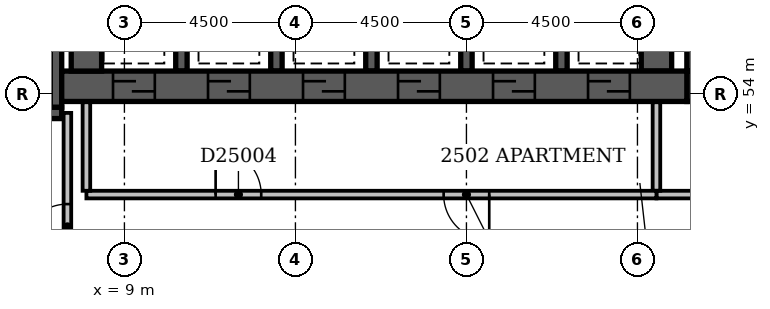
"""IFC4 building model, lengths in metres.
Left out: names, types, materials, properties, quantities, classifications, styles, units other than length and angle.
Written with IfcOpenShell. Run it as: python <this file> out.ifc"""

import sys

from ifc_helpers import new_model, si_unit, direction, frame, frame_2d, origin, place, context, subcontext, project, spatial, rectangle, extrude, element, fill, save


model = new_model("IFC4")
c1 = context("Model", 3, precision=1e-05, world=origin(), true_north=direction((0.0, 1.0)))
c2 = subcontext(c1, "Body", "Model", "MODEL_VIEW")
j1 = project(units=[si_unit("LENGTHUNIT", "METRE"), si_unit("PLANEANGLEUNIT", "RADIAN")], contexts=[c1])
p1 = place(None, origin())
s1 = spatial("IfcSite", under=j1, at=p1, CompositionType="ELEMENT")
p2 = place(p1, origin())
s2 = spatial("IfcBuilding", under=s1, at=p2, CompositionType="ELEMENT")
p3 = place(p2, frame((0.0, 0.0, 101.0)))
s3 = spatial("IfcBuildingStorey", under=s2, at=p3, CompositionType="ELEMENT", Elevation=101.0)
p4 = place(p3, frame((0.35, 53.5, -0.3), z_axis=(0.0, 0.0, 1.0), x_axis=(1.0, 0.0, 0.0)))
e1 = element("IfcWall", 1, at=p4, inside=s3, PredefinedType="SHEAR", context=c2, shape_type="SweptSolid", body=[
    extrude(rectangle(XDim=7.0, YDim=0.3, at=frame_2d((3.5, 0.0))), origin(), (0.0, 0.0, 1.0), 3.6),
])
p5 = place(p4, frame((5.58, 0.0, 0.3)))
e2 = element("IfcOpeningElement", 2, at=p5, cuts=e1, PredefinedType="OPENING", context=c2, shape_type="SweptSolid", body=[
    extrude(rectangle(XDim=1.1, YDim=2.1, at=frame_2d((0.55, 1.05))), frame((0.0, 0.162, 0.0), z_axis=(0.0, -1.0, 0.0), x_axis=(1.0, 0.0, 0.0)), (0.0, 0.0, 1.0), 0.324),
])
p6 = place(p3, frame((7.2, 53.65, -0.3), z_axis=(0.0, 0.0, 1.0), x_axis=(0.0, 1.0, 0.0)))
e3 = element("IfcWall", 3, at=p6, inside=s3, PredefinedType="SHEAR", context=c2, shape_type="SweptSolid", body=[
    extrude(rectangle(XDim=4.2, YDim=0.3, at=frame_2d((2.1, 0.0))), origin(), (0.0, 0.0, 1.0), 3.6),
])
p7 = place(p3, frame((7.35, 54.2, -0.3), z_axis=(0.0, 0.0, 1.0), x_axis=(1.0, 0.0, 0.0)))
e4 = element("IfcWall", 4, at=p7, inside=s3, PredefinedType="SHEAR", context=c2, shape_type="SweptSolid", body=[
    extrude(rectangle(XDim=16.45, YDim=0.8, at=frame_2d((8.225, 0.0))), origin(), (0.0, 0.0, 1.0), 3.6),
])
p8 = place(p7, frame((1.35, 0.0, 0.3)))
e5 = element("IfcOpeningElement", 5, at=p8, cuts=e4, PredefinedType="OPENING", context=c2, shape_type="SweptSolid", body=[
    extrude(rectangle(XDim=1.1, YDim=2.1, at=frame_2d((0.55, 1.05))), frame((0.0, 0.412, 0.0), z_axis=(0.0, -1.0, 0.0), x_axis=(1.0, 0.0, 0.0)), (0.0, 0.0, 1.0), 0.824),
])
p9 = place(p7, frame((3.85, 0.0, 0.3)))
e6 = element("IfcOpeningElement", 6, at=p9, cuts=e4, PredefinedType="OPENING", context=c2, shape_type="SweptSolid", body=[
    extrude(rectangle(XDim=1.1, YDim=2.1, at=frame_2d((0.55, 1.05))), frame((0.0, 0.412, 0.0), z_axis=(0.0, -1.0, 0.0), x_axis=(1.0, 0.0, 0.0)), (0.0, 0.0, 1.0), 0.824),
])
p10 = place(p7, frame((6.35, 0.0, 0.3)))
e7 = element("IfcOpeningElement", 7, at=p10, cuts=e4, PredefinedType="OPENING", context=c2, shape_type="SweptSolid", body=[
    extrude(rectangle(XDim=1.1, YDim=2.1, at=frame_2d((0.55, 1.05))), frame((0.0, 0.412, 0.0), z_axis=(0.0, -1.0, 0.0), x_axis=(1.0, 0.0, 0.0)), (0.0, 0.0, 1.0), 0.824),
])
p11 = place(p7, frame((8.85, 0.0, 0.3)))
e8 = element("IfcOpeningElement", 8, at=p11, cuts=e4, PredefinedType="OPENING", context=c2, shape_type="SweptSolid", body=[
    extrude(rectangle(XDim=1.1, YDim=2.1, at=frame_2d((0.55, 1.05))), frame((0.0, 0.412, 0.0), z_axis=(0.0, -1.0, 0.0), x_axis=(1.0, 0.0, 0.0)), (0.0, 0.0, 1.0), 0.824),
])
p12 = place(p7, frame((11.35, 0.0, 0.3)))
e9 = element("IfcOpeningElement", 9, at=p12, cuts=e4, PredefinedType="OPENING", context=c2, shape_type="SweptSolid", body=[
    extrude(rectangle(XDim=1.1, YDim=2.1, at=frame_2d((0.55, 1.05))), frame((0.0, 0.412, 0.0), z_axis=(0.0, -1.0, 0.0), x_axis=(1.0, 0.0, 0.0)), (0.0, 0.0, 1.0), 0.824),
])
p13 = place(p7, frame((13.85, 0.0, 0.3)))
e10 = element("IfcOpeningElement", 10, at=p13, cuts=e4, PredefinedType="OPENING", context=c2, shape_type="SweptSolid", body=[
    extrude(rectangle(XDim=1.1, YDim=2.1, at=frame_2d((0.55, 1.05))), frame((0.0, 0.412, 0.0), z_axis=(0.0, -1.0, 0.0), x_axis=(1.0, 0.0, 0.0)), (0.0, 0.0, 1.0), 0.824),
])
p14 = place(p3, frame((8.0, 54.6, -0.3), z_axis=(0.0, 0.0, 1.0), x_axis=(0.0, 1.0, 0.0)))
e11 = element("IfcWall", 11, at=p14, inside=s3, PredefinedType="SHEAR", context=c2, shape_type="SweptSolid", body=[
    extrude(rectangle(XDim=3.0, YDim=0.8, at=frame_2d((1.5, 0.0))), origin(), (0.0, 0.0, 1.0), 3.6),
])
for number, where, z_axis, x_axis in (
    (12, (10.5, 54.6, -0.3), (0.0, 0.0, 1.0), (0.0, 1.0, 0.0)),
    (13, (13.0, 54.6, -0.3), (0.0, 0.0, 1.0), (0.0, 1.0, 0.0)),
    (14, (15.5, 54.6, -0.3), (0.0, 0.0, 1.0), (0.0, 1.0, 0.0)),
    (15, (18.0, 54.6, -0.3), (0.0, 0.0, 1.0), (0.0, 1.0, 0.0)),
    (16, (20.5, 54.6, -0.3), (0.0, 0.0, 1.0), (0.0, 1.0, 0.0)),
):
    element("IfcWall", number, at=place(p3, frame(where, z_axis=z_axis, x_axis=x_axis)), inside=s3, PredefinedType="SHEAR", context=c2, shape_type="SweptSolid", body=[
        extrude(rectangle(XDim=3.0, YDim=0.3, at=frame_2d((1.5, 0.0))), origin(), (0.0, 0.0, 1.0), 3.6),
    ])
p15 = place(p3, frame((23.0, 54.6, -0.3), z_axis=(0.0, 0.0, 1.0), x_axis=(0.0, 1.0, 0.0)))
e17 = element("IfcWall", 17, at=p15, inside=s3, PredefinedType="SHEAR", context=c2, shape_type="SweptSolid", body=[
    extrude(rectangle(XDim=3.0, YDim=0.8, at=frame_2d((1.5, 0.0))), origin(), (0.0, 0.0, 1.0), 3.6),
])
p16 = place(p3, frame((23.8, 54.2, -0.3), z_axis=(0.0, 0.0, 1.0), x_axis=(1.0, 0.0, 0.0)))
e18 = element("IfcWall", 18, at=p16, inside=s3, PredefinedType="SHEAR", context=c2, shape_type="SweptSolid", body=[
    extrude(rectangle(XDim=3.3, YDim=0.8, at=frame_2d((1.65, 0.0))), origin(), (0.0, 0.0, 1.0), 3.6),
])
p17 = place(p16, frame((1.1, 0.0, 0.3)))
e19 = element("IfcOpeningElement", 19, at=p17, cuts=e18, PredefinedType="OPENING", context=c2, shape_type="SweptSolid", body=[
    extrude(rectangle(XDim=1.1, YDim=2.1, at=frame_2d((0.55, 1.05))), frame((0.0, 0.412, 0.0), z_axis=(0.0, -1.0, 0.0), x_axis=(1.0, 0.0, 0.0)), (0.0, 0.0, 1.0), 0.824),
])
p18 = place(p3, frame((24.2, 54.6, -0.3), z_axis=(0.0, 0.0, 1.0), x_axis=(0.0, 1.0, 0.0)))
e20 = element("IfcWall", 20, at=p18, inside=s3, PredefinedType="SHEAR", context=c2, shape_type="SweptSolid", body=[
    extrude(rectangle(XDim=3.0, YDim=0.8, at=frame_2d((1.5, 0.0))), origin(), (0.0, 0.0, 1.0), 3.6),
])
p19 = place(p3, frame((8.0, 51.35, 0.0), z_axis=(0.0, 0.0, 1.0), x_axis=(1.0, 0.0, 0.0)))
e21 = element("IfcWall", 21, at=p19, inside=s3, PredefinedType="PARTITIONING", context=c2, shape_type="SweptSolid", body=[
    extrude(rectangle(XDim=15.0, YDim=0.2, at=frame_2d((7.5, 0.0))), origin(), (0.0, 0.0, 1.0), 3.3),
])
p20 = place(p19, frame((3.4, 0.0, 0.0)))
e22 = element("IfcOpeningElement", 22, at=p20, cuts=e21, PredefinedType="OPENING", context=c2, shape_type="SweptSolid", body=[
    extrude(rectangle(XDim=1.2, YDim=2.1, at=frame_2d((0.6, 1.05))), frame((0.0, 0.112, 0.0), z_axis=(0.0, -1.0, 0.0), x_axis=(1.0, 0.0, 0.0)), (0.0, 0.0, 1.0), 0.224),
])
p21 = place(p19, frame((9.4, 0.0, 0.0)))
e23 = element("IfcOpeningElement", 23, at=p21, cuts=e21, PredefinedType="OPENING", context=c2, shape_type="SweptSolid", body=[
    extrude(rectangle(XDim=1.2, YDim=2.1, at=frame_2d((0.6, 1.05))), frame((0.0, 0.112, 0.0), z_axis=(0.0, -1.0, 0.0), x_axis=(1.0, 0.0, 0.0)), (0.0, 0.0, 1.0), 0.224),
])
for number, where, z_axis, x_axis in (
    (24, (23.0, 51.45, 0.0), (0.0, 0.0, 1.0), (0.0, 1.0, 0.0)),
    (25, (8.0, 51.45, 0.0), (0.0, 0.0, 1.0), (0.0, 1.0, 0.0)),
):
    element("IfcWall", number, at=place(p3, frame(where, z_axis=z_axis, x_axis=x_axis)), inside=s3, PredefinedType="PARTITIONING", context=c2, shape_type="SweptSolid", body=[
        extrude(rectangle(XDim=2.33, YDim=0.2, at=frame_2d((1.165, 0.0))), origin(), (0.0, 0.0, 1.0), 3.3),
    ])
p22 = place(p3, frame((23.0, 51.35, 0.0), z_axis=(0.0, 0.0, 1.0), x_axis=(1.0, 0.0, 0.0)))
e26 = element("IfcWall", 26, at=p22, inside=s3, PredefinedType="PARTITIONING", context=c2, shape_type="SweptSolid", body=[
    extrude(rectangle(XDim=4.8, YDim=0.2, at=frame_2d((2.4, 0.0))), origin(), (0.0, 0.0, 1.0), 3.3),
])
p23 = place(p22, frame((1.65, 0.0, 0.0)))
e27 = element("IfcOpeningElement", 27, at=p23, cuts=e26, PredefinedType="OPENING", context=c2, shape_type="SweptSolid", body=[
    extrude(rectangle(XDim=1.2, YDim=2.1, at=frame_2d((0.6, 1.05))), frame((0.0, 0.112, 0.0), z_axis=(0.0, -1.0, 0.0), x_axis=(1.0, 0.0, 0.0)), (0.0, 0.0, 1.0), 0.224),
])
p24 = place(p3, frame((7.5, 49.6, 0.0), z_axis=(0.0, 0.0, 1.0), x_axis=(0.0, 1.0, 0.0)))
e28 = element("IfcWall", 28, at=p24, inside=s3, PredefinedType="PARTITIONING", context=c2, shape_type="SweptSolid", body=[
    extrude(rectangle(XDim=3.9, YDim=0.2, at=frame_2d((1.95, 0.0))), origin(), (0.0, 0.0, 1.0), 3.3),
])
p25 = place(p24, frame((0.3, 0.0, 0.0)))
e29 = element("IfcOpeningElement", 29, at=p25, cuts=e28, PredefinedType="OPENING", context=c2, shape_type="SweptSolid", body=[
    extrude(rectangle(XDim=1.2, YDim=2.1, at=frame_2d((0.6, 1.05))), frame((0.0, 0.112, 0.0), z_axis=(0.0, -1.0, 0.0), x_axis=(1.0, 0.0, 0.0)), (0.0, 0.0, 1.0), 0.224),
])
p26 = place(p25, origin())
e30 = element("IfcDoor", 30, at=p26, inside=s3, OperationType="SINGLE_SWING_LEFT", PredefinedType="DOOR", context=c2, shape_type="SweptSolid", body=[
    extrude(rectangle(XDim=1.2, YDim=2.1, at=frame_2d((0.6, 1.05))), frame((0.0, 0.025, 0.0), z_axis=(0.0, -1.0, 0.0), x_axis=(1.0, 0.0, 0.0)), (0.0, 0.0, 1.0), 0.05),
])
fill(e29, e30)
p27 = place(p8, origin())
e31 = element("IfcDoor", 31, at=p27, inside=s3, OperationType="SLIDING_TO_LEFT", PredefinedType="DOOR", context=c2, shape_type="SweptSolid", body=[
    extrude(rectangle(XDim=1.1, YDim=2.1, at=frame_2d((0.55, 1.05))), frame((0.0, 0.025, 0.0), z_axis=(0.0, -1.0, 0.0), x_axis=(1.0, 0.0, 0.0)), (0.0, 0.0, 1.0), 0.05),
])
fill(e5, e31)
p28 = place(p9, origin())
e32 = element("IfcDoor", 32, at=p28, inside=s3, OperationType="SLIDING_TO_LEFT", PredefinedType="DOOR", context=c2, shape_type="SweptSolid", body=[
    extrude(rectangle(XDim=1.1, YDim=2.1, at=frame_2d((0.55, 1.05))), frame((0.0, 0.025, 0.0), z_axis=(0.0, -1.0, 0.0), x_axis=(1.0, 0.0, 0.0)), (0.0, 0.0, 1.0), 0.05),
])
fill(e6, e32)
p29 = place(p10, origin())
e33 = element("IfcDoor", 33, at=p29, inside=s3, OperationType="SLIDING_TO_LEFT", PredefinedType="DOOR", context=c2, shape_type="SweptSolid", body=[
    extrude(rectangle(XDim=1.1, YDim=2.1, at=frame_2d((0.55, 1.05))), frame((0.0, 0.025, 0.0), z_axis=(0.0, -1.0, 0.0), x_axis=(1.0, 0.0, 0.0)), (0.0, 0.0, 1.0), 0.05),
])
fill(e7, e33)
p30 = place(p11, origin())
e34 = element("IfcDoor", 34, at=p30, inside=s3, OperationType="SLIDING_TO_LEFT", PredefinedType="DOOR", context=c2, shape_type="SweptSolid", body=[
    extrude(rectangle(XDim=1.1, YDim=2.1, at=frame_2d((0.55, 1.05))), frame((0.0, 0.025, 0.0), z_axis=(0.0, -1.0, 0.0), x_axis=(1.0, 0.0, 0.0)), (0.0, 0.0, 1.0), 0.05),
])
fill(e8, e34)
p31 = place(p12, origin())
e35 = element("IfcDoor", 35, at=p31, inside=s3, OperationType="SLIDING_TO_LEFT", PredefinedType="DOOR", context=c2, shape_type="SweptSolid", body=[
    extrude(rectangle(XDim=1.1, YDim=2.1, at=frame_2d((0.55, 1.05))), frame((0.0, 0.025, 0.0), z_axis=(0.0, -1.0, 0.0), x_axis=(1.0, 0.0, 0.0)), (0.0, 0.0, 1.0), 0.05),
])
fill(e9, e35)
p32 = place(p13, origin())
e36 = element("IfcDoor", 36, at=p32, inside=s3, OperationType="SLIDING_TO_LEFT", PredefinedType="DOOR", context=c2, shape_type="SweptSolid", body=[
    extrude(rectangle(XDim=1.1, YDim=2.1, at=frame_2d((0.55, 1.05))), frame((0.0, 0.025, 0.0), z_axis=(0.0, -1.0, 0.0), x_axis=(1.0, 0.0, 0.0)), (0.0, 0.0, 1.0), 0.05),
])
fill(e10, e36)
p33 = place(p20, origin())
e37 = element("IfcDoor", 37, at=p33, inside=s3, OperationType="SINGLE_SWING_LEFT", PredefinedType="DOOR", context=c2, shape_type="SweptSolid", body=[
    extrude(rectangle(XDim=1.2, YDim=2.1, at=frame_2d((0.6, 1.05))), frame((0.0, 0.025, 0.0), z_axis=(0.0, -1.0, 0.0), x_axis=(1.0, 0.0, 0.0)), (0.0, 0.0, 1.0), 0.05),
])
fill(e22, e37)
p34 = place(p21, origin())
e38 = element("IfcDoor", 38, at=p34, inside=s3, OperationType="SINGLE_SWING_RIGHT", PredefinedType="DOOR", context=c2, shape_type="SweptSolid", body=[
    extrude(rectangle(XDim=1.2, YDim=2.1, at=frame_2d((0.6, 1.05))), frame((0.0, 0.025, 0.0), z_axis=(0.0, -1.0, 0.0), x_axis=(1.0, 0.0, 0.0)), (0.0, 0.0, 1.0), 0.05),
])
fill(e23, e38)
save(model, sys.argv[1])
